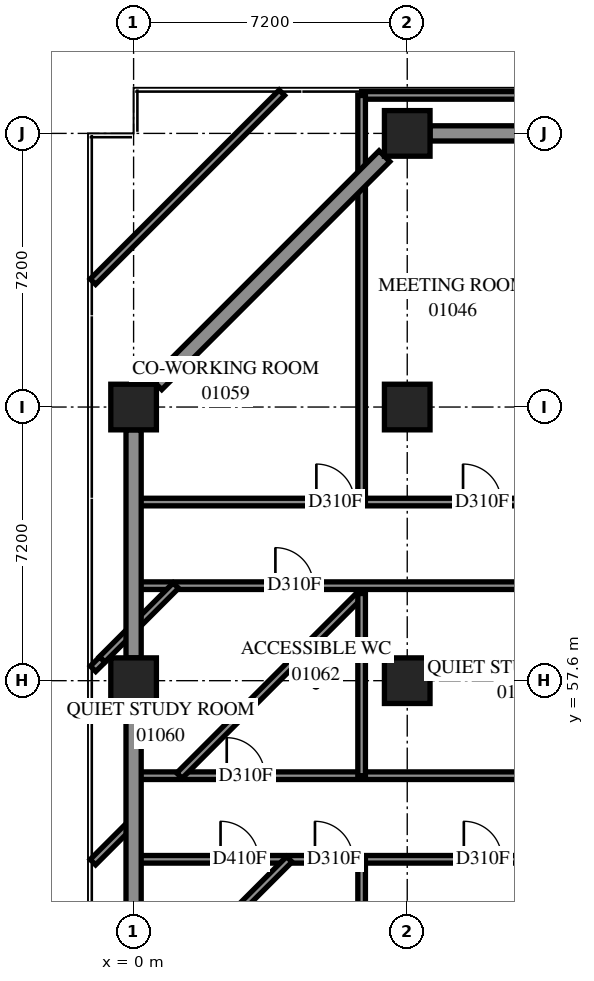
"""IFC4 building model, lengths in metres.
Left out: names, types, materials, properties, quantities, classifications, styles, units other than length and angle.
Written with IfcOpenShell. Run it as: python <this file> out.ifc"""

import sys

from ifc_helpers import new_model, si_unit, direction, frame, frame_2d, origin, origin_2d, place, context, subcontext, project, spatial, rectangle, extrude, element, fill, save


model = new_model("IFC4")
c1 = context("Model", 3, precision=1e-05, world=origin(), true_north=direction((0.0, 1.0)))
c2 = subcontext(c1, "Body", "Model", "MODEL_VIEW")
j1 = project(units=[si_unit("LENGTHUNIT", "METRE"), si_unit("PLANEANGLEUNIT", "RADIAN")], contexts=[c1])
p1 = place(None, origin())
s1 = spatial("IfcSite", under=j1, at=p1, CompositionType="ELEMENT")
p2 = place(p1, origin())
s2 = spatial("IfcBuilding", under=s1, at=p2, CompositionType="ELEMENT")
p3 = place(p2, frame((0.0, 0.0, 6.0)))
s3 = spatial("IfcBuildingStorey", under=s2, at=p3, CompositionType="ELEMENT", Elevation=6.0)
for number, where, z_axis, x_axis in (
    (1, (0.0, 57.6, 0.0), (0.0, 0.0, 1.0), (1.0, 0.0, 0.0)),
    (2, (0.0, 64.8, 0.0), (0.0, 0.0, 1.0), (1.0, 0.0, 0.0)),
    (3, (7.2, 57.6, 0.0), (0.0, 0.0, 1.0), (1.0, 0.0, 0.0)),
    (4, (7.2, 64.8, 0.0), (0.0, 0.0, 1.0), (1.0, 0.0, 0.0)),
    (5, (7.2, 72.0, 0.0), (0.0, 0.0, 1.0), (1.0, 0.0, 0.0)),
):
    element("IfcColumn", number, at=place(p3, frame(where, z_axis=z_axis, x_axis=x_axis)), inside=s3, PredefinedType="COLUMN", context=c2, shape_type="SweptSolid", body=[
        extrude(rectangle(XDim=1.2, YDim=1.2, at=origin_2d()), origin(), (0.0, 0.0, 1.0), 3.8),
    ])
p4 = place(p3, frame((6.0, 73.0, 0.0), z_axis=(0.0, 0.0, 1.0), x_axis=(1.0, 0.0, 0.0)))
e6 = element("IfcWall", 6, at=p4, inside=s3, PredefinedType="PARTITIONING", context=c2, shape_type="SweptSolid", body=[
    extrude(rectangle(XDim=73.2, YDim=0.2, at=frame_2d((36.6, 0.0))), origin(), (0.0, 0.0, 1.0), 3.8),
])
p5 = place(p3, frame((0.0, 55.1, 0.0), z_axis=(0.0, 0.0, 1.0), x_axis=(1.0, 0.0, 0.0)))
e7 = element("IfcWall", 7, at=p5, inside=s3, PredefinedType="PARTITIONING", context=c2, shape_type="SweptSolid", body=[
    extrude(rectangle(XDim=54.4, YDim=0.2, at=frame_2d((27.2, 0.0))), origin(), (0.0, 0.0, 1.0), 3.8),
])
p6 = place(p5, frame((10.485, 0.0, 0.0)))
e8 = element("IfcOpeningElement", 8, at=p6, cuts=e7, PredefinedType="OPENING", context=c2, shape_type="SweptSolid", body=[
    extrude(rectangle(XDim=1.0, YDim=2.1, at=frame_2d((0.5, 1.05))), frame((0.0, 0.11, 0.0), z_axis=(0.0, -1.0, 0.0), x_axis=(1.0, 0.0, 0.0)), (0.0, 0.0, 1.0), 0.22),
])
p7 = place(p5, frame((16.475, 0.0, 0.0)))
e9 = element("IfcOpeningElement", 9, at=p7, cuts=e7, PredefinedType="OPENING", context=c2, shape_type="SweptSolid", body=[
    extrude(rectangle(XDim=1.0, YDim=2.1, at=frame_2d((0.5, 1.05))), frame((0.0, 0.11, 0.0), z_axis=(0.0, -1.0, 0.0), x_axis=(1.0, 0.0, 0.0)), (0.0, 0.0, 1.0), 0.22),
])
p8 = place(p5, frame((22.025, 0.0, 0.0)))
e10 = element("IfcOpeningElement", 10, at=p8, cuts=e7, PredefinedType="OPENING", context=c2, shape_type="SweptSolid", body=[
    extrude(rectangle(XDim=1.0, YDim=2.1, at=frame_2d((0.5, 1.05))), frame((0.0, 0.11, 0.0), z_axis=(0.0, -1.0, 0.0), x_axis=(1.0, 0.0, 0.0)), (0.0, 0.0, 1.0), 0.22),
])
p9 = place(p5, frame((34.484, 0.0, 0.0)))
e11 = element("IfcOpeningElement", 11, at=p9, cuts=e7, PredefinedType="OPENING", context=c2, shape_type="SweptSolid", body=[
    extrude(rectangle(XDim=1.0, YDim=2.1, at=frame_2d((0.5, 1.05))), frame((0.0, 0.11, 0.0), z_axis=(0.0, -1.0, 0.0), x_axis=(1.0, 0.0, 0.0)), (0.0, 0.0, 1.0), 0.22),
])
p10 = place(p5, frame((40.125, 0.0, 0.0)))
e12 = element("IfcOpeningElement", 12, at=p10, cuts=e7, PredefinedType="OPENING", context=c2, shape_type="SweptSolid", body=[
    extrude(rectangle(XDim=1.0, YDim=2.1, at=frame_2d((0.5, 1.05))), frame((0.0, 0.11, 0.0), z_axis=(0.0, -1.0, 0.0), x_axis=(1.0, 0.0, 0.0)), (0.0, 0.0, 1.0), 0.22),
])
p11 = place(p5, frame((47.086, 0.0, 0.0)))
e13 = element("IfcOpeningElement", 13, at=p11, cuts=e7, PredefinedType="OPENING", context=c2, shape_type="SweptSolid", body=[
    extrude(rectangle(XDim=1.0, YDim=2.1, at=frame_2d((0.5, 1.05))), frame((0.0, 0.11, 0.0), z_axis=(0.0, -1.0, 0.0), x_axis=(1.0, 0.0, 0.0)), (0.0, 0.0, 1.0), 0.22),
])
p12 = place(p5, frame((52.709, 0.0, 0.0)))
e14 = element("IfcOpeningElement", 14, at=p12, cuts=e7, PredefinedType="OPENING", context=c2, shape_type="SweptSolid", body=[
    extrude(rectangle(XDim=1.0, YDim=2.1, at=frame_2d((0.5, 1.05))), frame((0.0, 0.11, 0.0), z_axis=(0.0, -1.0, 0.0), x_axis=(1.0, 0.0, 0.0)), (0.0, 0.0, 1.0), 0.22),
])
p13 = place(p5, frame((2.451, 0.0, 0.0)))
e15 = element("IfcOpeningElement", 15, at=p13, cuts=e7, PredefinedType="OPENING", context=c2, shape_type="SweptSolid", body=[
    extrude(rectangle(XDim=1.0, YDim=2.1, at=frame_2d((0.5, 1.05))), frame((0.0, 0.11, 0.0), z_axis=(0.0, -1.0, 0.0), x_axis=(1.0, 0.0, 0.0)), (0.0, 0.0, 1.0), 0.22),
])
p14 = place(p3, frame((0.0, 52.9, 0.0), z_axis=(0.0, 0.0, 1.0), x_axis=(1.0, 0.0, 0.0)))
e16 = element("IfcWall", 16, at=p14, inside=s3, PredefinedType="PARTITIONING", context=c2, shape_type="SweptSolid", body=[
    extrude(rectangle(XDim=54.4, YDim=0.2, at=frame_2d((27.2, 0.0))), origin(), (0.0, 0.0, 1.0), 3.8),
])
p15 = place(p14, frame((8.689, 0.0, 0.0)))
e17 = element("IfcOpeningElement", 17, at=p15, cuts=e16, PredefinedType="OPENING", context=c2, shape_type="SweptSolid", body=[
    extrude(rectangle(XDim=1.0, YDim=2.1, at=frame_2d((0.5, 1.05))), frame((0.0, 0.11, 0.0), z_axis=(0.0, -1.0, 0.0), x_axis=(1.0, 0.0, 0.0)), (0.0, 0.0, 1.0), 0.22),
])
p16 = place(p14, frame((11.325, 0.0, 0.0)))
e18 = element("IfcOpeningElement", 18, at=p16, cuts=e16, PredefinedType="OPENING", context=c2, shape_type="SweptSolid", body=[
    extrude(rectangle(XDim=1.0, YDim=2.1, at=frame_2d((0.5, 1.05))), frame((0.0, 0.11, 0.0), z_axis=(0.0, -1.0, 0.0), x_axis=(1.0, 0.0, 0.0)), (0.0, 0.0, 1.0), 0.22),
])
p17 = place(p14, frame((18.262, 0.0, 0.0)))
e19 = element("IfcOpeningElement", 19, at=p17, cuts=e16, PredefinedType="OPENING", context=c2, shape_type="SweptSolid", body=[
    extrude(rectangle(XDim=1.0, YDim=2.1, at=frame_2d((0.5, 1.05))), frame((0.0, 0.11, 0.0), z_axis=(0.0, -1.0, 0.0), x_axis=(1.0, 0.0, 0.0)), (0.0, 0.0, 1.0), 0.22),
])
p18 = place(p14, frame((23.633, 0.0, 0.0)))
e20 = element("IfcOpeningElement", 20, at=p18, cuts=e16, PredefinedType="OPENING", context=c2, shape_type="SweptSolid", body=[
    extrude(rectangle(XDim=1.0, YDim=2.1, at=frame_2d((0.5, 1.05))), frame((0.0, 0.11, 0.0), z_axis=(0.0, -1.0, 0.0), x_axis=(1.0, 0.0, 0.0)), (0.0, 0.0, 1.0), 0.22),
])
p19 = place(p14, frame((27.538, 0.0, 0.0)))
e21 = element("IfcOpeningElement", 21, at=p19, cuts=e16, PredefinedType="OPENING", context=c2, shape_type="SweptSolid", body=[
    extrude(rectangle(XDim=1.0, YDim=2.1, at=frame_2d((0.5, 1.05))), frame((0.0, 0.11, 0.0), z_axis=(0.0, -1.0, 0.0), x_axis=(1.0, 0.0, 0.0)), (0.0, 0.0, 1.0), 0.22),
])
p20 = place(p14, frame((32.907, 0.0, 0.0)))
e22 = element("IfcOpeningElement", 22, at=p20, cuts=e16, PredefinedType="OPENING", context=c2, shape_type="SweptSolid", body=[
    extrude(rectangle(XDim=1.0, YDim=2.1, at=frame_2d((0.5, 1.05))), frame((0.0, 0.11, 0.0), z_axis=(0.0, -1.0, 0.0), x_axis=(1.0, 0.0, 0.0)), (0.0, 0.0, 1.0), 0.22),
])
p21 = place(p14, frame((38.032, 0.0, 0.0)))
e23 = element("IfcOpeningElement", 23, at=p21, cuts=e16, PredefinedType="OPENING", context=c2, shape_type="SweptSolid", body=[
    extrude(rectangle(XDim=1.0, YDim=2.1, at=frame_2d((0.5, 1.05))), frame((0.0, 0.11, 0.0), z_axis=(0.0, -1.0, 0.0), x_axis=(1.0, 0.0, 0.0)), (0.0, 0.0, 1.0), 0.22),
])
p22 = place(p14, frame((41.938, 0.0, 0.0)))
e24 = element("IfcOpeningElement", 24, at=p22, cuts=e16, PredefinedType="OPENING", context=c2, shape_type="SweptSolid", body=[
    extrude(rectangle(XDim=1.0, YDim=2.1, at=frame_2d((0.5, 1.05))), frame((0.0, 0.11, 0.0), z_axis=(0.0, -1.0, 0.0), x_axis=(1.0, 0.0, 0.0)), (0.0, 0.0, 1.0), 0.22),
])
p23 = place(p14, frame((47.307, 0.0, 0.0)))
e25 = element("IfcOpeningElement", 25, at=p23, cuts=e16, PredefinedType="OPENING", context=c2, shape_type="SweptSolid", body=[
    extrude(rectangle(XDim=1.0, YDim=2.1, at=frame_2d((0.5, 1.05))), frame((0.0, 0.11, 0.0), z_axis=(0.0, -1.0, 0.0), x_axis=(1.0, 0.0, 0.0)), (0.0, 0.0, 1.0), 0.22),
])
p24 = place(p14, frame((52.432, 0.0, 0.0)))
e26 = element("IfcOpeningElement", 26, at=p24, cuts=e16, PredefinedType="OPENING", context=c2, shape_type="SweptSolid", body=[
    extrude(rectangle(XDim=1.0, YDim=2.1, at=frame_2d((0.5, 1.05))), frame((0.0, 0.11, 0.0), z_axis=(0.0, -1.0, 0.0), x_axis=(1.0, 0.0, 0.0)), (0.0, 0.0, 1.0), 0.22),
])
p25 = place(p14, frame((2.288, 0.0, 0.0)))
e27 = element("IfcOpeningElement", 27, at=p25, cuts=e16, PredefinedType="OPENING", context=c2, shape_type="SweptSolid", body=[
    extrude(rectangle(XDim=1.0, YDim=2.1, at=frame_2d((0.5, 1.05))), frame((0.0, 0.11, 0.0), z_axis=(0.0, -1.0, 0.0), x_axis=(1.0, 0.0, 0.0)), (0.0, 0.0, 1.0), 0.22),
])
p26 = place(p14, frame((4.772, 0.0, 0.0)))
e28 = element("IfcOpeningElement", 28, at=p26, cuts=e16, PredefinedType="OPENING", context=c2, shape_type="SweptSolid", body=[
    extrude(rectangle(XDim=1.0, YDim=2.1, at=frame_2d((0.5, 1.05))), frame((0.0, 0.11, 0.0), z_axis=(0.0, -1.0, 0.0), x_axis=(1.0, 0.0, 0.0)), (0.0, 0.0, 1.0), 0.22),
])
p27 = place(p3, frame((0.002, 60.1, 0.0), z_axis=(0.0, 0.0, 1.0), x_axis=(1.0, 0.0, 0.0)))
e29 = element("IfcWall", 29, at=p27, inside=s3, PredefinedType="PARTITIONING", context=c2, shape_type="SweptSolid", body=[
    extrude(rectangle(XDim=54.398, YDim=0.2, at=frame_2d((27.199, 0.0))), origin(), (0.0, 0.0, 1.0), 3.8),
])
p28 = place(p27, frame((3.729, 0.0, 0.0)))
e30 = element("IfcOpeningElement", 30, at=p28, cuts=e29, PredefinedType="OPENING", context=c2, shape_type="SweptSolid", body=[
    extrude(rectangle(XDim=1.0, YDim=2.1, at=frame_2d((0.5, 1.05))), frame((0.0, 0.11, 0.0), z_axis=(0.0, -1.0, 0.0), x_axis=(1.0, 0.0, 0.0)), (0.0, 0.0, 1.0), 0.22),
])
p29 = place(p3, frame((0.002, 62.3, 0.0), z_axis=(0.0, 0.0, 1.0), x_axis=(1.0, 0.0, 0.0)))
e31 = element("IfcWall", 31, at=p29, inside=s3, PredefinedType="PARTITIONING", context=c2, shape_type="SweptSolid", body=[
    extrude(rectangle(XDim=54.398, YDim=0.2, at=frame_2d((27.199, 0.0))), origin(), (0.0, 0.0, 1.0), 3.8),
])
p30 = place(p29, frame((8.667, 0.0, 0.0)))
e32 = element("IfcOpeningElement", 32, at=p30, cuts=e31, PredefinedType="OPENING", context=c2, shape_type="SweptSolid", body=[
    extrude(rectangle(XDim=1.0, YDim=2.1, at=frame_2d((0.5, 1.05))), frame((0.0, 0.11, 0.0), z_axis=(0.0, -1.0, 0.0), x_axis=(1.0, 0.0, 0.0)), (0.0, 0.0, 1.0), 0.22),
])
p31 = place(p29, frame((13.136, 0.0, 0.0)))
e33 = element("IfcOpeningElement", 33, at=p31, cuts=e31, PredefinedType="OPENING", context=c2, shape_type="SweptSolid", body=[
    extrude(rectangle(XDim=1.0, YDim=2.1, at=frame_2d((0.5, 1.05))), frame((0.0, 0.11, 0.0), z_axis=(0.0, -1.0, 0.0), x_axis=(1.0, 0.0, 0.0)), (0.0, 0.0, 1.0), 0.22),
])
p32 = place(p29, frame((18.566, 0.0, 0.0)))
e34 = element("IfcOpeningElement", 34, at=p32, cuts=e31, PredefinedType="OPENING", context=c2, shape_type="SweptSolid", body=[
    extrude(rectangle(XDim=1.0, YDim=2.1, at=frame_2d((0.5, 1.05))), frame((0.0, 0.11, 0.0), z_axis=(0.0, -1.0, 0.0), x_axis=(1.0, 0.0, 0.0)), (0.0, 0.0, 1.0), 0.22),
])
p33 = place(p29, frame((27.256, 0.0, 0.0)))
e35 = element("IfcOpeningElement", 35, at=p33, cuts=e31, PredefinedType="OPENING", context=c2, shape_type="SweptSolid", body=[
    extrude(rectangle(XDim=1.0, YDim=2.1, at=frame_2d((0.5, 1.05))), frame((0.0, 0.11, 0.0), z_axis=(0.0, -1.0, 0.0), x_axis=(1.0, 0.0, 0.0)), (0.0, 0.0, 1.0), 0.22),
])
p34 = place(p29, frame((34.736, 0.0, 0.0)))
e36 = element("IfcOpeningElement", 36, at=p34, cuts=e31, PredefinedType="OPENING", context=c2, shape_type="SweptSolid", body=[
    extrude(rectangle(XDim=1.0, YDim=2.1, at=frame_2d((0.5, 1.05))), frame((0.0, 0.11, 0.0), z_axis=(0.0, -1.0, 0.0), x_axis=(1.0, 0.0, 0.0)), (0.0, 0.0, 1.0), 0.22),
])
p35 = place(p29, frame((40.166, 0.0, 0.0)))
e37 = element("IfcOpeningElement", 37, at=p35, cuts=e31, PredefinedType="OPENING", context=c2, shape_type="SweptSolid", body=[
    extrude(rectangle(XDim=1.0, YDim=2.1, at=frame_2d((0.5, 1.05))), frame((0.0, 0.11, 0.0), z_axis=(0.0, -1.0, 0.0), x_axis=(1.0, 0.0, 0.0)), (0.0, 0.0, 1.0), 0.22),
])
p36 = place(p29, frame((45.291, 0.0, 0.0)))
e38 = element("IfcOpeningElement", 38, at=p36, cuts=e31, PredefinedType="OPENING", context=c2, shape_type="SweptSolid", body=[
    extrude(rectangle(XDim=1.0, YDim=2.1, at=frame_2d((0.5, 1.05))), frame((0.0, 0.11, 0.0), z_axis=(0.0, -1.0, 0.0), x_axis=(1.0, 0.0, 0.0)), (0.0, 0.0, 1.0), 0.22),
])
p37 = place(p29, frame((49.136, 0.0, 0.0)))
e39 = element("IfcOpeningElement", 39, at=p37, cuts=e31, PredefinedType="OPENING", context=c2, shape_type="SweptSolid", body=[
    extrude(rectangle(XDim=1.0, YDim=2.1, at=frame_2d((0.5, 1.05))), frame((0.0, 0.11, 0.0), z_axis=(0.0, -1.0, 0.0), x_axis=(1.0, 0.0, 0.0)), (0.0, 0.0, 1.0), 0.22),
])
p38 = place(p29, frame((4.807, 0.0, 0.0)))
e40 = element("IfcOpeningElement", 40, at=p38, cuts=e31, PredefinedType="OPENING", context=c2, shape_type="SweptSolid", body=[
    extrude(rectangle(XDim=1.0, YDim=2.1, at=frame_2d((0.5, 1.05))), frame((0.0, 0.11, 0.0), z_axis=(0.0, -1.0, 0.0), x_axis=(1.0, 0.0, 0.0)), (0.0, 0.0, 1.0), 0.22),
])
p39 = place(p3, frame((6.0, 42.13, 0.0), z_axis=(0.0, 0.0, 1.0), x_axis=(0.0, 1.0, 0.0)))
e41 = element("IfcWall", 41, at=p39, inside=s3, PredefinedType="PARTITIONING", context=c2, shape_type="SweptSolid", body=[
    extrude(rectangle(XDim=10.77, YDim=0.2, at=frame_2d((5.385, 0.0))), origin(), (0.0, 0.0, 1.0), 3.8),
])
p40 = place(p3, frame((6.0, 62.3, 0.0), z_axis=(0.0, 0.0, 1.0), x_axis=(0.0, 1.0, 0.0)))
e42 = element("IfcWall", 42, at=p40, inside=s3, PredefinedType="PARTITIONING", context=c2, shape_type="SweptSolid", body=[
    extrude(rectangle(XDim=10.698, YDim=0.2, at=frame_2d((5.349, 0.0))), origin(), (0.0, 0.0, 1.0), 3.8),
])
p41 = place(p3, frame((-1.071, 47.733, 0.0), z_axis=(0.0, 0.0, 1.0), x_axis=(0.7071067812, 0.7071067812, 0.0)))
e43 = element("IfcWall", 43, at=p41, inside=s3, PredefinedType="PARTITIONING", context=c2, shape_type="SweptSolid", body=[
    extrude(rectangle(XDim=7.309, YDim=0.2, at=frame_2d((3.654, 0.0))), origin(), (0.0, 0.0, 1.0), 3.8),
])
p42 = place(p3, frame((-1.071, 68.099, 0.0), z_axis=(0.0, 0.0, 1.0), x_axis=(0.7071067812, 0.7071067812, 0.0)))
e44 = element("IfcWall", 44, at=p42, inside=s3, PredefinedType="PARTITIONING", context=c2, shape_type="SweptSolid", body=[
    extrude(rectangle(XDim=7.032, YDim=0.2, at=frame_2d((3.516, 0.0))), origin(), (0.0, 0.0, 1.0), 3.8),
])
p43 = place(p3, frame((1.205, 55.101, 0.0), z_axis=(0.0, 0.0, 1.0), x_axis=(0.7071067812, 0.7071067812, 0.0)))
e45 = element("IfcWall", 45, at=p43, inside=s3, PredefinedType="PARTITIONING", context=c2, shape_type="SweptSolid", body=[
    extrude(rectangle(XDim=6.78, YDim=0.2, at=frame_2d((3.39, 0.0))), origin(), (0.0, 0.0, 1.0), 3.8),
])
p44 = place(p3, frame((6.0, 55.1, 0.0), z_axis=(0.0, 0.0, 1.0), x_axis=(0.0, 1.0, 0.0)))
e46 = element("IfcWall", 46, at=p44, inside=s3, PredefinedType="PARTITIONING", context=c2, shape_type="SweptSolid", body=[
    extrude(rectangle(XDim=4.794, YDim=0.2, at=frame_2d((2.397, 0.0))), origin(), (0.0, 0.0, 1.0), 3.8),
])
p45 = place(p3, frame((-0.828, 58.16, 0.0), z_axis=(0.0, 0.0, 1.0), x_axis=(0.7067423871, 0.7074709875, 0.0)))
e47 = element("IfcWall", 47, at=p45, inside=s3, PredefinedType="PARTITIONING", context=c2, shape_type="SweptSolid", body=[
    extrude(rectangle(XDim=2.745, YDim=0.2, at=frame_2d((1.373, 0.0))), origin(), (0.0, 0.0, 1.0), 3.8),
])
p46 = place(p3, frame((0.0, 52.9, 0.0), z_axis=(0.0, 0.0, 1.0), x_axis=(0.0, 1.0, 0.0)))
e48 = element("IfcWall", 48, at=p46, inside=s3, PredefinedType="PARTITIONING", context=c2, shape_type="SweptSolid", body=[
    extrude(rectangle(XDim=2.2, YDim=0.2, at=frame_2d((1.1, 0.0))), origin(), (0.0, 0.0, 1.0), 3.2),
])
p47 = place(p3, frame((0.0, 60.102, 0.0), z_axis=(0.0, 0.0, 1.0), x_axis=(0.0, 1.0, 0.0)))
e49 = element("IfcWall", 49, at=p47, inside=s3, PredefinedType="PARTITIONING", context=c2, shape_type="SweptSolid", body=[
    extrude(rectangle(XDim=2.196, YDim=0.2, at=frame_2d((1.098, 0.0))), origin(), (0.0, 0.0, 1.0), 3.2),
])
p48 = place(p3, frame((-1.071, 52.825, 0.0), z_axis=(0.0, 0.0, 1.0), x_axis=(0.7071067812, 0.7071067812, 0.0)))
e50 = element("IfcWall", 50, at=p48, inside=s3, PredefinedType="PARTITIONING", context=c2, shape_type="SweptSolid", body=[
    extrude(rectangle(XDim=1.513, YDim=0.2, at=frame_2d((0.757, 0.0))), origin(), (0.0, 0.0, 1.0), 3.8),
])
p49 = place(p3, frame((-1.067, 57.913, 0.0), z_axis=(0.0, 0.0, 1.0), x_axis=(0.7100106736, 0.704190914, 0.0)))
e51 = element("IfcWall", 51, at=p49, inside=s3, PredefinedType="PARTITIONING", context=c2, shape_type="SweptSolid", body=[
    extrude(rectangle(XDim=0.344, YDim=0.2, at=frame_2d((0.172, 0.0))), origin(), (0.0, 0.0, 1.0), 3.8),
])
p50 = place(p15, origin())
e52 = element("IfcDoor", 52, at=p50, inside=s3, OperationType="SINGLE_SWING_LEFT", PredefinedType="DOOR", context=c2, shape_type="SweptSolid", body=[
    extrude(rectangle(XDim=1.0, YDim=2.1, at=frame_2d((0.5, 1.05))), frame((0.0, 0.025, 0.0), z_axis=(0.0, -1.0, 0.0), x_axis=(1.0, 0.0, 0.0)), (0.0, 0.0, 1.0), 0.05),
])
fill(e17, e52)
p51 = place(p30, origin())
e53 = element("IfcDoor", 53, at=p51, inside=s3, OperationType="SINGLE_SWING_RIGHT", PredefinedType="DOOR", context=c2, shape_type="SweptSolid", body=[
    extrude(rectangle(XDim=1.0, YDim=2.1, at=frame_2d((0.5, 1.05))), frame((0.0, 0.025, 0.0), z_axis=(0.0, -1.0, 0.0), x_axis=(1.0, 0.0, 0.0)), (0.0, 0.0, 1.0), 0.05),
])
fill(e32, e53)
p52 = place(p38, origin())
e54 = element("IfcDoor", 54, at=p52, inside=s3, OperationType="SINGLE_SWING_LEFT", PredefinedType="DOOR", context=c2, shape_type="SweptSolid", body=[
    extrude(rectangle(XDim=1.0, YDim=2.1, at=frame_2d((0.5, 1.05))), frame((0.0, 0.025, 0.0), z_axis=(0.0, -1.0, 0.0), x_axis=(1.0, 0.0, 0.0)), (0.0, 0.0, 1.0), 0.05),
])
fill(e40, e54)
p53 = place(p28, origin())
e55 = element("IfcDoor", 55, at=p53, inside=s3, OperationType="SINGLE_SWING_LEFT", PredefinedType="DOOR", context=c2, shape_type="SweptSolid", body=[
    extrude(rectangle(XDim=1.0, YDim=2.1, at=frame_2d((0.5, 1.05))), frame((0.0, 0.025, 0.0), z_axis=(0.0, -1.0, 0.0), x_axis=(1.0, 0.0, 0.0)), (0.0, 0.0, 1.0), 0.05),
])
fill(e30, e55)
p54 = place(p25, origin())
e56 = element("IfcDoor", 56, at=p54, inside=s3, OperationType="SINGLE_SWING_RIGHT", PredefinedType="DOOR", context=c2, shape_type="SweptSolid", body=[
    extrude(rectangle(XDim=1.0, YDim=2.1, at=frame_2d((0.5, 1.05))), frame((0.0, 0.025, 0.0), z_axis=(0.0, -1.0, 0.0), x_axis=(1.0, 0.0, 0.0)), (0.0, 0.0, 1.0), 0.05),
])
fill(e27, e56)
p55 = place(p13, origin())
e57 = element("IfcDoor", 57, at=p55, inside=s3, OperationType="SINGLE_SWING_LEFT", PredefinedType="DOOR", context=c2, shape_type="SweptSolid", body=[
    extrude(rectangle(XDim=1.0, YDim=2.1, at=frame_2d((0.5, 1.05))), frame((0.0, 0.025, 0.0), z_axis=(0.0, -1.0, 0.0), x_axis=(1.0, 0.0, 0.0)), (0.0, 0.0, 1.0), 0.05),
])
fill(e15, e57)
p56 = place(p26, origin())
e58 = element("IfcDoor", 58, at=p56, inside=s3, OperationType="SINGLE_SWING_LEFT", PredefinedType="DOOR", context=c2, shape_type="SweptSolid", body=[
    extrude(rectangle(XDim=1.0, YDim=2.1, at=frame_2d((0.5, 1.05))), frame((0.0, 0.025, 0.0), z_axis=(0.0, -1.0, 0.0), x_axis=(1.0, 0.0, 0.0)), (0.0, 0.0, 1.0), 0.05),
])
fill(e28, e58)
save(model, sys.argv[1])
